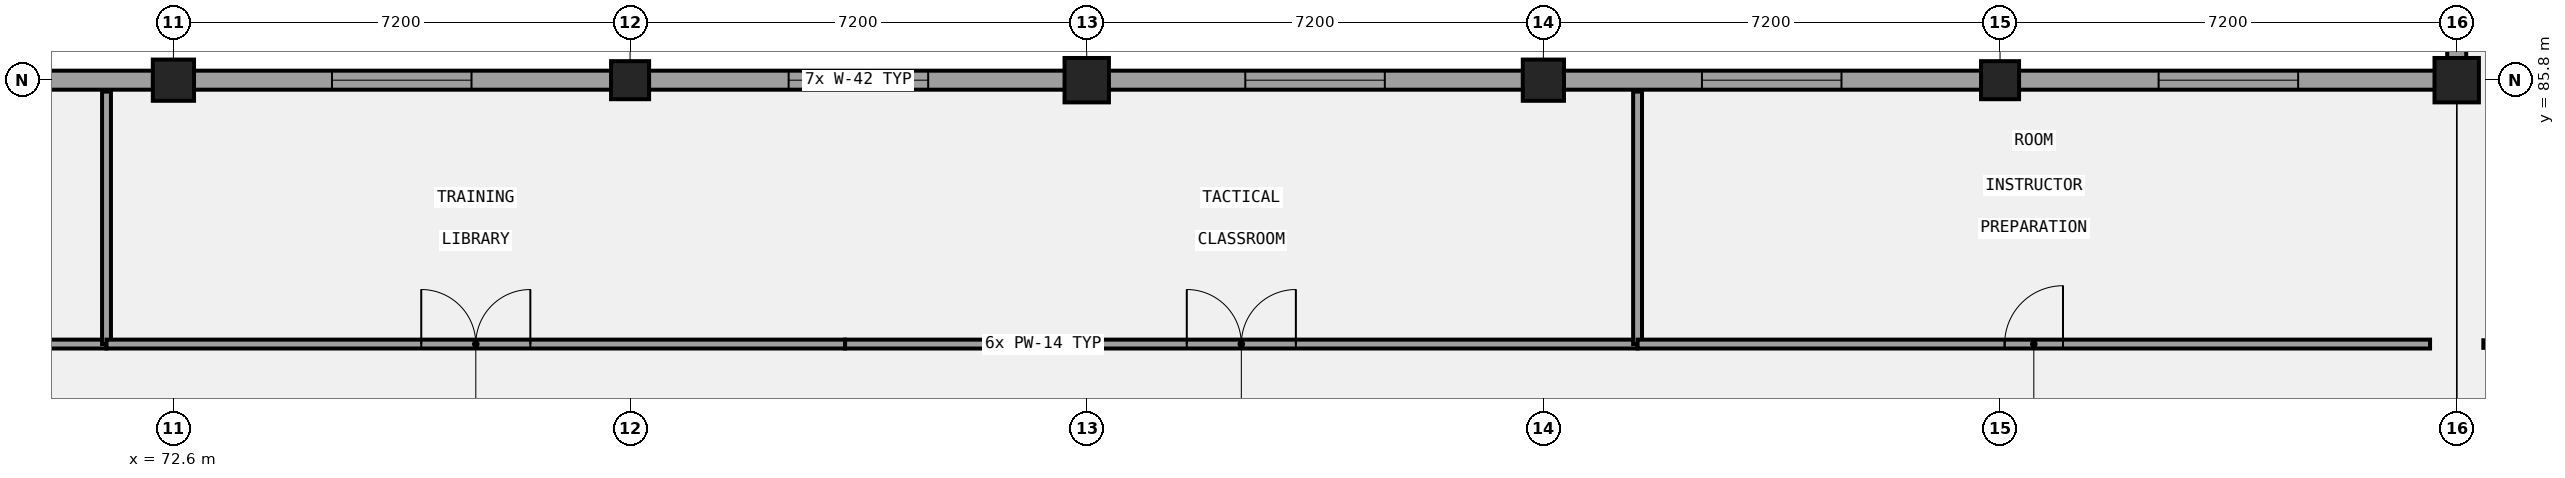
"""IFC4 building model, lengths in metres.
Left out: names, types, materials, properties, quantities, classifications, styles, units other than length and angle.
Written with IfcOpenShell. Run it as: python <this file> out.ifc"""

import sys

from ifc_helpers import new_model, si_unit, direction, frame, frame_2d, origin, origin_2d, place, context, subcontext, project, spatial, rectangle, extrude, element, fill, save


model = new_model("IFC4")
c1 = context("Model", 3, precision=1e-05, world=origin(), true_north=direction((0.0, 1.0)))
c2 = subcontext(c1, "Body", "Model", "MODEL_VIEW")
j1 = project(units=[si_unit("LENGTHUNIT", "METRE"), si_unit("PLANEANGLEUNIT", "RADIAN")], contexts=[c1])
p1 = place(None, origin())
s1 = spatial("IfcSite", under=j1, at=p1, CompositionType="ELEMENT")
p2 = place(p1, origin())
s2 = spatial("IfcBuilding", under=s1, at=p2, CompositionType="ELEMENT")
p3 = place(p2, frame((0.0, 0.0, 13.8)))
s3 = spatial("IfcBuildingStorey", under=s2, at=p3, CompositionType="ELEMENT", Elevation=13.8)
p4 = place(p3, frame((72.6, 85.8, 0.0), z_axis=(0.0, 0.0, 1.0), x_axis=(1.0, 0.0, 0.0)))
e1 = element("IfcColumn", 1, at=p4, inside=s3, PredefinedType="COLUMN", context=c2, shape_type="SweptSolid", body=[
    extrude(rectangle(XDim=0.65, YDim=0.65, at=origin_2d()), origin(), (0.0, 0.0, 1.0), 4.2),
])
p5 = place(p3, frame((79.8, 85.8, 0.0), z_axis=(0.0, 0.0, 1.0), x_axis=(1.0, 0.0, 0.0)))
e2 = element("IfcColumn", 2, at=p5, inside=s3, PredefinedType="COLUMN", context=c2, shape_type="SweptSolid", body=[
    extrude(rectangle(XDim=0.6, YDim=0.6, at=origin_2d()), origin(), (0.0, 0.0, 1.0), 4.2),
])
p6 = place(p3, frame((87.0, 85.8, 0.0), z_axis=(0.0, 0.0, 1.0), x_axis=(1.0, 0.0, 0.0)))
e3 = element("IfcColumn", 3, at=p6, inside=s3, PredefinedType="COLUMN", context=c2, shape_type="SweptSolid", body=[
    extrude(rectangle(XDim=0.7, YDim=0.7, at=origin_2d()), origin(), (0.0, 0.0, 1.0), 4.2),
])
p7 = place(p3, frame((94.2, 85.8, 0.0), z_axis=(0.0, 0.0, 1.0), x_axis=(1.0, 0.0, 0.0)))
e4 = element("IfcColumn", 4, at=p7, inside=s3, PredefinedType="COLUMN", context=c2, shape_type="SweptSolid", body=[
    extrude(rectangle(XDim=0.65, YDim=0.65, at=origin_2d()), origin(), (0.0, 0.0, 1.0), 4.2),
])
p8 = place(p3, frame((101.4, 85.8, 0.0), z_axis=(0.0, 0.0, 1.0), x_axis=(1.0, 0.0, 0.0)))
e5 = element("IfcColumn", 5, at=p8, inside=s3, PredefinedType="COLUMN", context=c2, shape_type="SweptSolid", body=[
    extrude(rectangle(XDim=0.6, YDim=0.6, at=origin_2d()), origin(), (0.0, 0.0, 1.0), 4.2),
])
p9 = place(p3, frame((108.6, 85.8, 0.0), z_axis=(0.0, 0.0, 1.0), x_axis=(1.0, 0.0, 0.0)))
e6 = element("IfcColumn", 6, at=p9, inside=s3, PredefinedType="COLUMN", context=c2, shape_type="SweptSolid", body=[
    extrude(rectangle(XDim=0.7, YDim=0.7, at=origin_2d()), origin(), (0.0, 0.0, 1.0), 4.2),
])
p10 = place(p3, frame((108.6, 92.81, 0.0), z_axis=(0.0, 0.0, 1.0), x_axis=(0.0, -1.0, 0.0)))
e7 = element("IfcWall", 7, at=p10, inside=s3, PredefinedType="SOLIDWALL", context=c2, shape_type="SweptSolid", body=[
    extrude(rectangle(XDim=6.86, YDim=0.3, at=frame_2d((3.43, 0.0))), origin(), (0.0, 0.0, 1.0), 2.94),
])
p11 = place(p10, frame((2.43, 0.0, 0.95)))
e8 = element("IfcOpeningElement", 8, at=p11, cuts=e7, PredefinedType="OPENING", context=c2, shape_type="SweptSolid", body=[
    extrude(rectangle(XDim=2.0, YDim=1.65, at=frame_2d((1.0, 0.825))), frame((0.0, 0.16, 0.0), z_axis=(0.0, -1.0, 0.0), x_axis=(1.0, 0.0, 0.0)), (0.0, 0.0, 1.0), 0.32),
])
p12 = place(p3, frame((108.75, 85.8, 0.0), z_axis=(0.0, 0.0, 1.0), x_axis=(-1.0, 0.0, 0.0)))
e9 = element("IfcWall", 9, at=p12, inside=s3, PredefinedType="SOLIDWALL", context=c2, shape_type="SweptSolid", body=[
    extrude(rectangle(XDim=101.1, YDim=0.3, at=frame_2d((50.55, 0.0))), origin(), (0.0, 0.0, 1.0), 2.94),
])
p13 = place(p12, frame((96.25, 0.0, 1.0)))
e10 = element("IfcOpeningElement", 10, at=p13, cuts=e9, PredefinedType="OPENING", context=c2, shape_type="SweptSolid", body=[
    extrude(rectangle(XDim=2.2, YDim=1.65, at=frame_2d((1.1, 0.825))), frame((0.0, 0.16, 0.0), z_axis=(0.0, -1.0, 0.0), x_axis=(1.0, 0.0, 0.0)), (0.0, 0.0, 1.0), 0.32),
])
p14 = place(p12, frame((89.05, 0.0, 1.0)))
e11 = element("IfcOpeningElement", 11, at=p14, cuts=e9, PredefinedType="OPENING", context=c2, shape_type="SweptSolid", body=[
    extrude(rectangle(XDim=2.2, YDim=1.65, at=frame_2d((1.1, 0.825))), frame((0.0, 0.16, 0.0), z_axis=(0.0, -1.0, 0.0), x_axis=(1.0, 0.0, 0.0)), (0.0, 0.0, 1.0), 0.32),
])
p15 = place(p12, frame((81.85, 0.0, 1.0)))
e12 = element("IfcOpeningElement", 12, at=p15, cuts=e9, PredefinedType="OPENING", context=c2, shape_type="SweptSolid", body=[
    extrude(rectangle(XDim=2.2, YDim=1.65, at=frame_2d((1.1, 0.825))), frame((0.0, 0.16, 0.0), z_axis=(0.0, -1.0, 0.0), x_axis=(1.0, 0.0, 0.0)), (0.0, 0.0, 1.0), 0.32),
])
p16 = place(p12, frame((74.65, 0.0, 1.0)))
e13 = element("IfcOpeningElement", 13, at=p16, cuts=e9, PredefinedType="OPENING", context=c2, shape_type="SweptSolid", body=[
    extrude(rectangle(XDim=2.2, YDim=1.65, at=frame_2d((1.1, 0.825))), frame((0.0, 0.16, 0.0), z_axis=(0.0, -1.0, 0.0), x_axis=(1.0, 0.0, 0.0)), (0.0, 0.0, 1.0), 0.32),
])
p17 = place(p12, frame((67.45, 0.0, 1.0)))
e14 = element("IfcOpeningElement", 14, at=p17, cuts=e9, PredefinedType="OPENING", context=c2, shape_type="SweptSolid", body=[
    extrude(rectangle(XDim=2.2, YDim=1.65, at=frame_2d((1.1, 0.825))), frame((0.0, 0.16, 0.0), z_axis=(0.0, -1.0, 0.0), x_axis=(1.0, 0.0, 0.0)), (0.0, 0.0, 1.0), 0.32),
])
p18 = place(p12, frame((60.25, 0.0, 1.0)))
e15 = element("IfcOpeningElement", 15, at=p18, cuts=e9, PredefinedType="OPENING", context=c2, shape_type="SweptSolid", body=[
    extrude(rectangle(XDim=2.2, YDim=1.65, at=frame_2d((1.1, 0.825))), frame((0.0, 0.16, 0.0), z_axis=(0.0, -1.0, 0.0), x_axis=(1.0, 0.0, 0.0)), (0.0, 0.0, 1.0), 0.32),
])
p19 = place(p12, frame((53.05, 0.0, 1.0)))
e16 = element("IfcOpeningElement", 16, at=p19, cuts=e9, PredefinedType="OPENING", context=c2, shape_type="SweptSolid", body=[
    extrude(rectangle(XDim=2.2, YDim=1.65, at=frame_2d((1.1, 0.825))), frame((0.0, 0.16, 0.0), z_axis=(0.0, -1.0, 0.0), x_axis=(1.0, 0.0, 0.0)), (0.0, 0.0, 1.0), 0.32),
])
p20 = place(p12, frame((45.85, 0.0, 1.0)))
e17 = element("IfcOpeningElement", 17, at=p20, cuts=e9, PredefinedType="OPENING", context=c2, shape_type="SweptSolid", body=[
    extrude(rectangle(XDim=2.2, YDim=1.65, at=frame_2d((1.1, 0.825))), frame((0.0, 0.16, 0.0), z_axis=(0.0, -1.0, 0.0), x_axis=(1.0, 0.0, 0.0)), (0.0, 0.0, 1.0), 0.32),
])
p21 = place(p12, frame((38.65, 0.0, 1.0)))
e18 = element("IfcOpeningElement", 18, at=p21, cuts=e9, PredefinedType="OPENING", context=c2, shape_type="SweptSolid", body=[
    extrude(rectangle(XDim=2.2, YDim=1.65, at=frame_2d((1.1, 0.825))), frame((0.0, 0.16, 0.0), z_axis=(0.0, -1.0, 0.0), x_axis=(1.0, 0.0, 0.0)), (0.0, 0.0, 1.0), 0.32),
])
p22 = place(p12, frame((31.45, 0.0, 1.0)))
e19 = element("IfcOpeningElement", 19, at=p22, cuts=e9, PredefinedType="OPENING", context=c2, shape_type="SweptSolid", body=[
    extrude(rectangle(XDim=2.2, YDim=1.65, at=frame_2d((1.1, 0.825))), frame((0.0, 0.16, 0.0), z_axis=(0.0, -1.0, 0.0), x_axis=(1.0, 0.0, 0.0)), (0.0, 0.0, 1.0), 0.32),
])
p23 = place(p12, frame((24.25, 0.0, 1.0)))
e20 = element("IfcOpeningElement", 20, at=p23, cuts=e9, PredefinedType="OPENING", context=c2, shape_type="SweptSolid", body=[
    extrude(rectangle(XDim=2.2, YDim=1.65, at=frame_2d((1.1, 0.825))), frame((0.0, 0.16, 0.0), z_axis=(0.0, -1.0, 0.0), x_axis=(1.0, 0.0, 0.0)), (0.0, 0.0, 1.0), 0.32),
])
p24 = place(p12, frame((17.05, 0.0, 1.0)))
e21 = element("IfcOpeningElement", 21, at=p24, cuts=e9, PredefinedType="OPENING", context=c2, shape_type="SweptSolid", body=[
    extrude(rectangle(XDim=2.2, YDim=1.65, at=frame_2d((1.1, 0.825))), frame((0.0, 0.16, 0.0), z_axis=(0.0, -1.0, 0.0), x_axis=(1.0, 0.0, 0.0)), (0.0, 0.0, 1.0), 0.32),
])
p25 = place(p12, frame((9.85, 0.0, 1.0)))
e22 = element("IfcOpeningElement", 22, at=p25, cuts=e9, PredefinedType="OPENING", context=c2, shape_type="SweptSolid", body=[
    extrude(rectangle(XDim=2.2, YDim=1.65, at=frame_2d((1.1, 0.825))), frame((0.0, 0.16, 0.0), z_axis=(0.0, -1.0, 0.0), x_axis=(1.0, 0.0, 0.0)), (0.0, 0.0, 1.0), 0.32),
])
p26 = place(p12, frame((2.65, 0.0, 1.0)))
e23 = element("IfcOpeningElement", 23, at=p26, cuts=e9, PredefinedType="OPENING", context=c2, shape_type="SweptSolid", body=[
    extrude(rectangle(XDim=2.2, YDim=1.65, at=frame_2d((1.1, 0.825))), frame((0.0, 0.16, 0.0), z_axis=(0.0, -1.0, 0.0), x_axis=(1.0, 0.0, 0.0)), (0.0, 0.0, 1.0), 0.32),
])
p27 = place(p3, frame((109.02, 81.64, 0.0), z_axis=(0.0, 0.0, 1.0), x_axis=(1.0, 0.0, 0.0)))
e24 = element("IfcWall", 24, at=p27, inside=s3, PredefinedType="PARTITIONING", context=c2, shape_type="SweptSolid", body=[
    extrude(rectangle(XDim=7.032, YDim=0.12, at=frame_2d((3.516, 0.0))), origin(), (0.0, 0.0, 1.0), 3.94),
])
p28 = place(p27, frame((3.026, 0.0, 0.0)))
e25 = element("IfcOpeningElement", 25, at=p28, cuts=e24, PredefinedType="OPENING", context=c2, shape_type="SweptSolid", body=[
    extrude(rectangle(XDim=0.98, YDim=2.22, at=frame_2d((0.49, 1.11))), frame((0.0, 0.07, 0.0), z_axis=(0.0, -1.0, 0.0), x_axis=(1.0, 0.0, 0.0)), (0.0, 0.0, 1.0), 0.14),
])
p29 = place(p3, frame((58.2, 81.64, 0.0), z_axis=(0.0, 0.0, 1.0), x_axis=(1.0, 0.0, 0.0)))
e26 = element("IfcWall", 26, at=p29, inside=s3, PredefinedType="PARTITIONING", context=c2, shape_type="SweptSolid", body=[
    extrude(rectangle(XDim=13.345, YDim=0.14, at=frame_2d((6.672, 0.0))), origin(), (0.0, 0.0, 1.0), 3.94),
])
p30 = place(p29, frame((5.812, 0.0, 0.0)))
e27 = element("IfcOpeningElement", 27, at=p30, cuts=e26, PredefinedType="OPENING", context=c2, shape_type="SweptSolid", body=[
    extrude(rectangle(XDim=1.72, YDim=2.1, at=frame_2d((0.86, 1.05))), frame((0.0, 0.08, 0.0), z_axis=(0.0, -1.0, 0.0), x_axis=(1.0, 0.0, 0.0)), (0.0, 0.0, 1.0), 0.16),
])
p31 = place(p3, frame((71.545, 81.64, 0.0), z_axis=(0.0, 0.0, 1.0), x_axis=(0.0, 1.0, 0.0)))
e28 = element("IfcWall", 28, at=p31, inside=s3, PredefinedType="PARTITIONING", context=c2, shape_type="SweptSolid", body=[
    extrude(rectangle(XDim=3.98, YDim=0.14, at=frame_2d((1.99, 0.0))), origin(), (0.0, 0.0, 1.0), 3.94),
])
p32 = place(p3, frame((71.545, 81.64, 0.0), z_axis=(0.0, 0.0, 1.0), x_axis=(1.0, 0.0, 0.0)))
e29 = element("IfcWall", 29, at=p32, inside=s3, PredefinedType="PARTITIONING", context=c2, shape_type="SweptSolid", body=[
    extrude(rectangle(XDim=11.645, YDim=0.14, at=frame_2d((5.823, 0.0))), origin(), (0.0, 0.0, 1.0), 3.94),
])
p33 = place(p32, frame((4.962, 0.0, 0.0)))
e30 = element("IfcOpeningElement", 30, at=p33, cuts=e29, PredefinedType="OPENING", context=c2, shape_type="SweptSolid", body=[
    extrude(rectangle(XDim=1.72, YDim=2.22, at=frame_2d((0.86, 1.11))), frame((0.0, 0.08, 0.0), z_axis=(0.0, -1.0, 0.0), x_axis=(1.0, 0.0, 0.0)), (0.0, 0.0, 1.0), 0.16),
])
p34 = place(p3, frame((83.19, 81.64, 0.0), z_axis=(0.0, 0.0, 1.0), x_axis=(1.0, 0.0, 0.0)))
e31 = element("IfcWall", 31, at=p34, inside=s3, PredefinedType="PARTITIONING", context=c2, shape_type="SweptSolid", body=[
    extrude(rectangle(XDim=12.495, YDim=0.14, at=frame_2d((6.248, 0.0))), origin(), (0.0, 0.0, 1.0), 3.94),
])
p35 = place(p34, frame((5.387, 0.0, 0.0)))
e32 = element("IfcOpeningElement", 32, at=p35, cuts=e31, PredefinedType="OPENING", context=c2, shape_type="SweptSolid", body=[
    extrude(rectangle(XDim=1.72, YDim=2.35, at=frame_2d((0.86, 1.175))), frame((0.0, 0.08, 0.0), z_axis=(0.0, -1.0, 0.0), x_axis=(1.0, 0.0, 0.0)), (0.0, 0.0, 1.0), 0.16),
])
p36 = place(p3, frame((95.685, 81.64, 0.0), z_axis=(0.0, 0.0, 1.0), x_axis=(0.0, 1.0, 0.0)))
e33 = element("IfcWall", 33, at=p36, inside=s3, PredefinedType="PARTITIONING", context=c2, shape_type="SweptSolid", body=[
    extrude(rectangle(XDim=3.98, YDim=0.14, at=frame_2d((1.99, 0.0))), origin(), (0.0, 0.0, 1.0), 3.94),
])
p37 = place(p3, frame((95.685, 81.64, 0.0), z_axis=(0.0, 0.0, 1.0), x_axis=(1.0, 0.0, 0.0)))
e34 = element("IfcWall", 34, at=p37, inside=s3, PredefinedType="PARTITIONING", context=c2, shape_type="SweptSolid", body=[
    extrude(rectangle(XDim=12.495, YDim=0.14, at=frame_2d((6.248, 0.0))), origin(), (0.0, 0.0, 1.0), 3.94),
])
p38 = place(p37, frame((5.788, 0.0, 0.0)))
e35 = element("IfcOpeningElement", 35, at=p38, cuts=e34, PredefinedType="OPENING", context=c2, shape_type="SweptSolid", body=[
    extrude(rectangle(XDim=0.92, YDim=2.1, at=frame_2d((0.46, 1.05))), frame((0.0, 0.08, 0.0), z_axis=(0.0, -1.0, 0.0), x_axis=(1.0, 0.0, 0.0)), (0.0, 0.0, 1.0), 0.16),
])
p39 = place(p22, origin())
e36 = element("IfcWindow", 36, at=p39, inside=s3, PartitioningType="SINGLE_PANEL", PredefinedType="WINDOW", context=c2, shape_type="SweptSolid", body=[
    extrude(rectangle(XDim=2.2, YDim=1.65, at=frame_2d((1.1, 0.825))), frame((0.0, 0.03, 0.0), z_axis=(0.0, -1.0, 0.0), x_axis=(1.0, 0.0, 0.0)), (0.0, 0.0, 1.0), 0.06),
])
fill(e19, e36)
p40 = place(p23, origin())
e37 = element("IfcWindow", 37, at=p40, inside=s3, PartitioningType="SINGLE_PANEL", PredefinedType="WINDOW", context=c2, shape_type="SweptSolid", body=[
    extrude(rectangle(XDim=2.2, YDim=1.65, at=frame_2d((1.1, 0.825))), frame((0.0, 0.03, 0.0), z_axis=(0.0, -1.0, 0.0), x_axis=(1.0, 0.0, 0.0)), (0.0, 0.0, 1.0), 0.06),
])
fill(e20, e37)
p41 = place(p24, origin())
e38 = element("IfcWindow", 38, at=p41, inside=s3, PartitioningType="SINGLE_PANEL", PredefinedType="WINDOW", context=c2, shape_type="SweptSolid", body=[
    extrude(rectangle(XDim=2.2, YDim=1.65, at=frame_2d((1.1, 0.825))), frame((0.0, 0.03, 0.0), z_axis=(0.0, -1.0, 0.0), x_axis=(1.0, 0.0, 0.0)), (0.0, 0.0, 1.0), 0.06),
])
fill(e21, e38)
p42 = place(p25, origin())
e39 = element("IfcWindow", 39, at=p42, inside=s3, PartitioningType="SINGLE_PANEL", PredefinedType="WINDOW", context=c2, shape_type="SweptSolid", body=[
    extrude(rectangle(XDim=2.2, YDim=1.65, at=frame_2d((1.1, 0.825))), frame((0.0, 0.03, 0.0), z_axis=(0.0, -1.0, 0.0), x_axis=(1.0, 0.0, 0.0)), (0.0, 0.0, 1.0), 0.06),
])
fill(e22, e39)
p43 = place(p26, origin())
e40 = element("IfcWindow", 40, at=p43, inside=s3, PartitioningType="SINGLE_PANEL", PredefinedType="WINDOW", context=c2, shape_type="SweptSolid", body=[
    extrude(rectangle(XDim=2.2, YDim=1.65, at=frame_2d((1.1, 0.825))), frame((0.0, 0.03, 0.0), z_axis=(0.0, -1.0, 0.0), x_axis=(1.0, 0.0, 0.0)), (0.0, 0.0, 1.0), 0.06),
])
fill(e23, e40)
p44 = place(p33, origin())
e41 = element("IfcDoor", 41, at=p44, inside=s3, OperationType="DOUBLE_DOOR_SINGLE_SWING", PredefinedType="DOOR", context=c2, shape_type="SweptSolid", body=[
    extrude(rectangle(XDim=1.72, YDim=2.22, at=frame_2d((0.86, 1.11))), frame((0.0, 0.025, 0.0), z_axis=(0.0, -1.0, 0.0), x_axis=(1.0, 0.0, 0.0)), (0.0, 0.0, 1.0), 0.05),
])
fill(e30, e41)
p45 = place(p35, origin())
e42 = element("IfcDoor", 42, at=p45, inside=s3, OperationType="DOUBLE_DOOR_SINGLE_SWING", PredefinedType="DOOR", context=c2, shape_type="SweptSolid", body=[
    extrude(rectangle(XDim=1.72, YDim=2.35, at=frame_2d((0.86, 1.175))), frame((0.0, 0.025, 0.0), z_axis=(0.0, -1.0, 0.0), x_axis=(1.0, 0.0, 0.0)), (0.0, 0.0, 1.0), 0.05),
])
fill(e32, e42)
p46 = place(p38, origin())
e43 = element("IfcDoor", 43, at=p46, inside=s3, OperationType="SINGLE_SWING_RIGHT", PredefinedType="DOOR", context=c2, shape_type="SweptSolid", body=[
    extrude(rectangle(XDim=0.92, YDim=2.1, at=frame_2d((0.46, 1.05))), frame((0.0, 0.025, 0.0), z_axis=(0.0, -1.0, 0.0), x_axis=(1.0, 0.0, 0.0)), (0.0, 0.0, 1.0), 0.05),
])
fill(e35, e43)
save(model, sys.argv[1])
